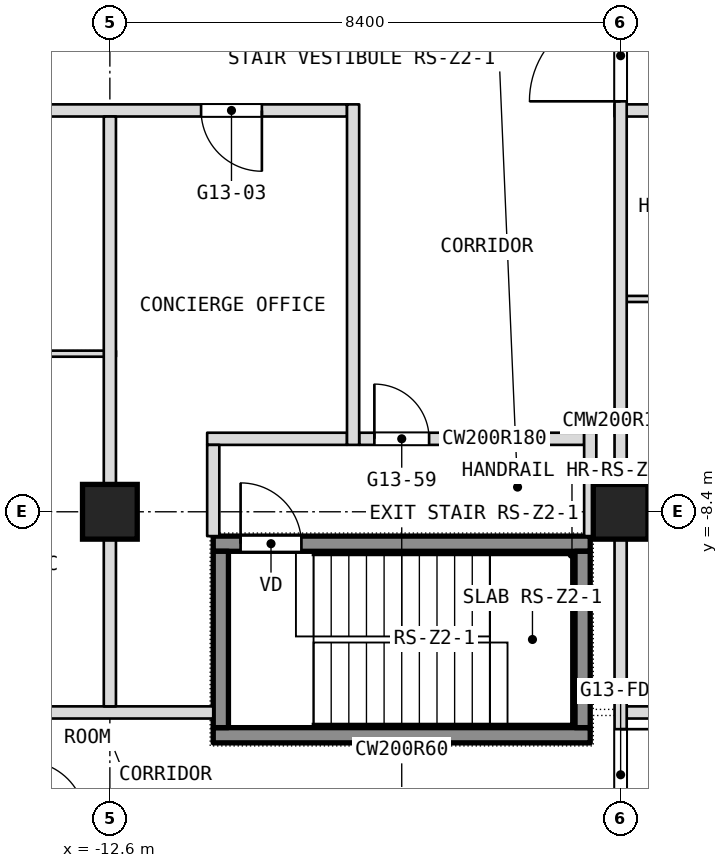
"""IFC4 building model, lengths in metres.
Left out: names, types, materials, properties, quantities, classifications, styles, units other than length and angle.
Written with IfcOpenShell. Run it as: python <this file> out.ifc"""

import sys

from ifc_helpers import new_model, si_unit, direction, frame, frame_2d, origin, origin_2d, place, context, subcontext, project, spatial, rectangle, extrude, element, fill, save


model = new_model("IFC4")
c1 = context("Model", 3, precision=1e-05, world=origin(), true_north=direction((0.0, 1.0)))
c2 = subcontext(c1, "Body", "Model", "MODEL_VIEW")
j1 = project(units=[si_unit("LENGTHUNIT", "METRE"), si_unit("PLANEANGLEUNIT", "RADIAN")], contexts=[c1])
p1 = place(None, origin())
s1 = spatial("IfcSite", under=j1, at=p1, CompositionType="ELEMENT")
p2 = place(p1, origin())
s2 = spatial("IfcBuilding", under=s1, at=p2, CompositionType="ELEMENT")
p3 = place(p2, frame((0.0, 0.0, 155.3)))
s3 = spatial("IfcBuildingStorey", under=s2, at=p3, CompositionType="ELEMENT", Elevation=155.3)
for number, where, z_axis, x_axis in (
    (1, (-12.6, -8.4, 0.0), (0.0, 0.0, 1.0), (1.0, 0.0, 0.0)),
    (2, (-4.2, -8.4, 0.0), (0.0, 0.0, 1.0), (1.0, 0.0, 0.0)),
):
    element("IfcColumn", number, at=place(p3, frame(where, z_axis=z_axis, x_axis=x_axis)), inside=s3, PredefinedType="COLUMN", context=c2, shape_type="SweptSolid", body=[
        extrude(rectangle(XDim=0.9, YDim=0.9, at=origin_2d()), origin(), (0.0, 0.0, 1.0), 3.6),
    ])
p4 = place(p3, frame((-16.7, -11.7, 0.0), z_axis=(0.0, 0.0, 1.0), x_axis=(1.0, 0.0, 0.0)))
e3 = element("IfcWall", 3, at=p4, inside=s3, PredefinedType="PARTITIONING", context=c2, shape_type="SweptSolid", body=[
    extrude(rectangle(XDim=5.8, YDim=0.2, at=frame_2d((2.9, 0.0))), origin(), (0.0, 0.0, 1.0), 3.34),
])
p5 = place(p3, frame((-4.1, -11.7, 0.0), z_axis=(0.0, 0.0, 1.0), x_axis=(1.0, 0.0, 0.0)))
e4 = element("IfcWall", 4, at=p5, inside=s3, PredefinedType="PARTITIONING", context=c2, shape_type="SweptSolid", body=[
    extrude(rectangle(XDim=20.8, YDim=0.2, at=frame_2d((10.4, 0.0))), origin(), (0.0, 0.0, 1.0), 3.34),
])
p6 = place(p5, frame((14.1, 0.0, 0.0)))
e5 = element("IfcOpeningElement", 5, at=p6, cuts=e4, PredefinedType="OPENING", context=c2, shape_type="SweptSolid", body=[
    extrude(rectangle(XDim=1.0, YDim=2.1, at=frame_2d((0.5, 1.05))), frame((0.0, 0.1, 0.0), z_axis=(0.0, -1.0, 0.0), x_axis=(1.0, 0.0, 0.0)), (0.0, 0.0, 1.0), 0.2),
])
p7 = place(p5, frame((5.7, 0.0, 0.0)))
e6 = element("IfcOpeningElement", 6, at=p7, cuts=e4, PredefinedType="OPENING", context=c2, shape_type="SweptSolid", body=[
    extrude(rectangle(XDim=1.0, YDim=2.1, at=frame_2d((0.5, 1.05))), frame((0.0, 0.1, 0.0), z_axis=(0.0, -1.0, 0.0), x_axis=(1.0, 0.0, 0.0)), (0.0, 0.0, 1.0), 0.2),
])
p8 = place(p3, frame((-11.0, -7.2, 0.0), z_axis=(0.0, 0.0, 1.0), x_axis=(1.0, 0.0, 0.0)))
e7 = element("IfcWall", 7, at=p8, inside=s3, PredefinedType="PARTITIONING", context=c2, shape_type="SweptSolid", body=[
    extrude(rectangle(XDim=2.3, YDim=0.2, at=frame_2d((1.15, 0.0))), origin(), (0.0, 0.0, 1.0), 3.34),
])
p9 = place(p3, frame((-8.5, -7.2, 0.0), z_axis=(0.0, 0.0, 1.0), x_axis=(1.0, 0.0, 0.0)))
e8 = element("IfcWall", 8, at=p9, inside=s3, PredefinedType="PARTITIONING", context=c2, shape_type="SweptSolid", body=[
    extrude(rectangle(XDim=3.7, YDim=0.2, at=frame_2d((1.85, 0.0))), origin(), (0.0, 0.0, 1.0), 3.34),
])
p10 = place(p9, frame((0.25, 0.0, 0.0)))
e9 = element("IfcOpeningElement", 9, at=p10, cuts=e8, PredefinedType="OPENING", context=c2, shape_type="SweptSolid", body=[
    extrude(rectangle(XDim=0.9, YDim=2.1, at=frame_2d((0.45, 1.05))), frame((0.0, 0.1, 0.0), z_axis=(0.0, -1.0, 0.0), x_axis=(1.0, 0.0, 0.0)), (0.0, 0.0, 1.0), 0.2),
])
p11 = place(p3, frame((-16.7, -5.8, 0.0), z_axis=(0.0, 0.0, 1.0), x_axis=(1.0, 0.0, 0.0)))
e10 = element("IfcWall", 10, at=p11, inside=s3, PredefinedType="PARTITIONING", context=c2, shape_type="SweptSolid", body=[
    extrude(rectangle(XDim=4.2, YDim=0.1, at=frame_2d((2.1, 0.0))), origin(), (0.0, 0.0, 1.0), 3.34),
])
p12 = place(p11, frame((1.55, 0.0, 0.0)))
e11 = element("IfcOpeningElement", 11, at=p12, cuts=e10, PredefinedType="OPENING", context=c2, shape_type="SweptSolid", body=[
    extrude(rectangle(XDim=0.9, YDim=2.1, at=frame_2d((0.45, 1.05))), frame((0.0, 0.05, 0.0), z_axis=(0.0, -1.0, 0.0), x_axis=(1.0, 0.0, 0.0)), (0.0, 0.0, 1.0), 0.1),
])
p13 = place(p3, frame((-4.1, -4.9, 0.0), z_axis=(0.0, 0.0, 1.0), x_axis=(1.0, 0.0, 0.0)))
e12 = element("IfcWall", 12, at=p13, inside=s3, PredefinedType="PARTITIONING", context=c2, shape_type="SweptSolid", body=[
    extrude(rectangle(XDim=4.2, YDim=0.1, at=frame_2d((2.1, 0.0))), origin(), (0.0, 0.0, 1.0), 3.34),
])
p14 = place(p13, frame((1.55, 0.0, 0.0)))
e13 = element("IfcOpeningElement", 13, at=p14, cuts=e12, PredefinedType="OPENING", context=c2, shape_type="SweptSolid", body=[
    extrude(rectangle(XDim=0.9, YDim=2.1, at=frame_2d((0.45, 1.05))), frame((0.0, 0.05, 0.0), z_axis=(0.0, -1.0, 0.0), x_axis=(1.0, 0.0, 0.0)), (0.0, 0.0, 1.0), 0.1),
])
p15 = place(p3, frame((-16.9, -1.8, 0.0), z_axis=(0.0, 0.0, 1.0), x_axis=(1.0, 0.0, 0.0)))
e14 = element("IfcWall", 14, at=p15, inside=s3, PredefinedType="PARTITIONING", context=c2, shape_type="SweptSolid", body=[
    extrude(rectangle(XDim=8.2, YDim=0.2, at=frame_2d((4.1, 0.0))), origin(), (0.0, 0.0, 1.0), 3.34),
])
p16 = place(p15, frame((1.7, 0.0, 0.0)))
e15 = element("IfcOpeningElement", 15, at=p16, cuts=e14, PredefinedType="OPENING", context=c2, shape_type="SweptSolid", body=[
    extrude(rectangle(XDim=1.0, YDim=2.1, at=frame_2d((0.5, 1.05))), frame((0.0, 0.1, 0.0), z_axis=(0.0, -1.0, 0.0), x_axis=(1.0, 0.0, 0.0)), (0.0, 0.0, 1.0), 0.2),
])
p17 = place(p15, frame((5.8, 0.0, 0.0)))
e16 = element("IfcOpeningElement", 16, at=p17, cuts=e14, PredefinedType="OPENING", context=c2, shape_type="SweptSolid", body=[
    extrude(rectangle(XDim=1.0, YDim=2.1, at=frame_2d((0.5, 1.05))), frame((0.0, 0.1, 0.0), z_axis=(0.0, -1.0, 0.0), x_axis=(1.0, 0.0, 0.0)), (0.0, 0.0, 1.0), 0.2),
])
p18 = place(p3, frame((-4.3, -1.8, 0.0), z_axis=(0.0, 0.0, 1.0), x_axis=(1.0, 0.0, 0.0)))
e17 = element("IfcWall", 17, at=p18, inside=s3, PredefinedType="PARTITIONING", context=c2, shape_type="SweptSolid", body=[
    extrude(rectangle(XDim=11.3, YDim=0.2, at=frame_2d((5.65, 0.0))), origin(), (0.0, 0.0, 1.0), 3.34),
])
p19 = place(p18, frame((1.7, 0.0, 0.0)))
e18 = element("IfcOpeningElement", 18, at=p19, cuts=e17, PredefinedType="OPENING", context=c2, shape_type="SweptSolid", body=[
    extrude(rectangle(XDim=1.0, YDim=2.1, at=frame_2d((0.5, 1.05))), frame((0.0, 0.1, 0.0), z_axis=(0.0, -1.0, 0.0), x_axis=(1.0, 0.0, 0.0)), (0.0, 0.0, 1.0), 0.2),
])
p20 = place(p18, frame((10.1, 0.0, 0.0)))
e19 = element("IfcOpeningElement", 19, at=p20, cuts=e17, PredefinedType="OPENING", context=c2, shape_type="SweptSolid", body=[
    extrude(rectangle(XDim=1.0, YDim=2.1, at=frame_2d((0.5, 1.05))), frame((0.0, 0.1, 0.0), z_axis=(0.0, -1.0, 0.0), x_axis=(1.0, 0.0, 0.0)), (0.0, 0.0, 1.0), 0.2),
])
p21 = place(p18, frame((5.9, 0.0, 0.0)))
e20 = element("IfcOpeningElement", 20, at=p21, cuts=e17, PredefinedType="OPENING", context=c2, shape_type="SweptSolid", body=[
    extrude(rectangle(XDim=1.0, YDim=2.1, at=frame_2d((0.5, 1.05))), frame((0.0, 0.1, 0.0), z_axis=(0.0, -1.0, 0.0), x_axis=(1.0, 0.0, 0.0)), (0.0, 0.0, 1.0), 0.2),
])
p22 = place(p3, frame((-4.2, -13.8, 0.0), z_axis=(0.0, 0.0, 1.0), x_axis=(0.0, 1.0, 0.0)))
e21 = element("IfcWall", 21, at=p22, inside=s3, PredefinedType="PARTITIONING", context=c2, shape_type="SweptSolid", body=[
    extrude(rectangle(XDim=13.8, YDim=0.2, at=frame_2d((6.9, 0.0))), origin(), (0.0, 0.0, 1.0), 3.34),
])
p23 = place(p22, frame((12.15, 0.0, 0.0)))
e22 = element("IfcOpeningElement", 22, at=p23, cuts=e21, PredefinedType="OPENING", context=c2, shape_type="SweptSolid", body=[
    extrude(rectangle(XDim=1.5, YDim=2.1, at=frame_2d((0.75, 1.05))), frame((0.0, 0.1, 0.0), z_axis=(0.0, -1.0, 0.0), x_axis=(1.0, 0.0, 0.0)), (0.0, 0.0, 1.0), 0.2),
])
p24 = place(p22, frame((0.325, 0.0, 0.0)))
e23 = element("IfcOpeningElement", 23, at=p24, cuts=e21, PredefinedType="OPENING", context=c2, shape_type="SweptSolid", body=[
    extrude(rectangle(XDim=1.5, YDim=2.1, at=frame_2d((0.75, 1.05))), frame((0.0, 0.1, 0.0), z_axis=(0.0, -1.0, 0.0), x_axis=(1.0, 0.0, 0.0)), (0.0, 0.0, 1.0), 0.2),
])
p25 = place(p3, frame((-4.7, -8.8, 0.0), z_axis=(0.0, 0.0, 1.0), x_axis=(0.0, 1.0, 0.0)))
e24 = element("IfcWall", 24, at=p25, inside=s3, PredefinedType="PARTITIONING", context=c2, shape_type="SweptSolid", body=[
    extrude(rectangle(XDim=1.7, YDim=0.2, at=frame_2d((0.85, 0.0))), origin(), (0.0, 0.0, 1.0), 3.34),
])
p26 = place(p3, frame((-8.6, -7.3, 0.0), z_axis=(0.0, 0.0, 1.0), x_axis=(0.0, 1.0, 0.0)))
e25 = element("IfcWall", 25, at=p26, inside=s3, PredefinedType="PARTITIONING", context=c2, shape_type="SweptSolid", body=[
    extrude(rectangle(XDim=5.6, YDim=0.2, at=frame_2d((2.8, 0.0))), origin(), (0.0, 0.0, 1.0), 3.34),
])
p27 = place(p3, frame((-10.9, -8.8, 0.0), z_axis=(0.0, 0.0, 1.0), x_axis=(0.0, 1.0, 0.0)))
e26 = element("IfcWall", 26, at=p27, inside=s3, PredefinedType="PARTITIONING", context=c2, shape_type="SweptSolid", body=[
    extrude(rectangle(XDim=1.5, YDim=0.2, at=frame_2d((0.75, 0.0))), origin(), (0.0, 0.0, 1.0), 3.34),
])
p28 = place(p3, frame((-12.6, -11.6, 0.0), z_axis=(0.0, 0.0, 1.0), x_axis=(0.0, 1.0, 0.0)))
e27 = element("IfcWall", 27, at=p28, inside=s3, PredefinedType="PARTITIONING", context=c2, shape_type="SweptSolid", body=[
    extrude(rectangle(XDim=9.7, YDim=0.2, at=frame_2d((4.85, 0.0))), origin(), (0.0, 0.0, 1.0), 3.34),
])
p29 = place(p3, frame((-10.9, -12.075, 0.1), z_axis=(0.0, 0.0, 1.0), x_axis=(1.0, 0.0, 0.0)))
e28 = element("IfcWall", 28, at=p29, inside=s3, PredefinedType="SHEAR", context=c2, shape_type="SweptSolid", body=[
    extrude(rectangle(XDim=6.2, YDim=0.25, at=frame_2d((3.1, 0.0))), origin(), (0.0, 0.0, 1.0), 3.6),
])
p30 = place(p3, frame((-10.9, -8.925, 0.1), z_axis=(0.0, 0.0, 1.0), x_axis=(1.0, 0.0, 0.0)))
e29 = element("IfcWall", 29, at=p30, inside=s3, PredefinedType="SHEAR", context=c2, shape_type="SweptSolid", body=[
    extrude(rectangle(XDim=6.2, YDim=0.25, at=frame_2d((3.1, 0.0))), origin(), (0.0, 0.0, 1.0), 3.6),
])
p31 = place(p30, frame((0.45, 0.0, 0.0)))
e30 = element("IfcOpeningElement", 30, at=p31, cuts=e29, PredefinedType="OPENING", context=c2, shape_type="SweptSolid", body=[
    extrude(rectangle(XDim=1.0, YDim=2.1, at=frame_2d((0.5, 1.05))), frame((0.0, 0.125, 0.0), z_axis=(0.0, -1.0, 0.0), x_axis=(1.0, 0.0, 0.0)), (0.0, 0.0, 1.0), 0.25),
])
for number, where, z_axis, x_axis in (
    (31, (-10.775, -11.95, 0.1), (0.0, 0.0, 1.0), (0.0, 1.0, 0.0)),
    (32, (-4.825, -11.95, 0.1), (0.0, 0.0, 1.0), (0.0, 1.0, 0.0)),
):
    element("IfcWall", number, at=place(p3, frame(where, z_axis=z_axis, x_axis=x_axis)), inside=s3, PredefinedType="SHEAR", context=c2, shape_type="SweptSolid", body=[
        extrude(rectangle(XDim=2.9, YDim=0.25, at=frame_2d((1.45, 0.0))), origin(), (0.0, 0.0, 1.0), 3.6),
    ])
p32 = place(p10, origin())
e33 = element("IfcDoor", 33, at=p32, inside=s3, OperationType="SINGLE_SWING_RIGHT", PredefinedType="DOOR", context=c2, shape_type="SweptSolid", body=[
    extrude(rectangle(XDim=0.9, YDim=2.1, at=frame_2d((0.45, 1.05))), frame((0.0, 0.025, 0.0), z_axis=(0.0, -1.0, 0.0), x_axis=(1.0, 0.0, 0.0)), (0.0, 0.0, 1.0), 0.05),
])
fill(e9, e33)
p33 = place(p17, origin())
e34 = element("IfcDoor", 34, at=p33, inside=s3, OperationType="SINGLE_SWING_LEFT", PredefinedType="DOOR", context=c2, shape_type="SweptSolid", body=[
    extrude(rectangle(XDim=1.0, YDim=2.1, at=frame_2d((0.5, 1.05))), frame((0.0, 0.025, 0.0), z_axis=(0.0, -1.0, 0.0), x_axis=(1.0, 0.0, 0.0)), (0.0, 0.0, 1.0), 0.05),
])
fill(e16, e34)
p34 = place(p31, origin())
e35 = element("IfcDoor", 35, at=p34, inside=s3, OperationType="SINGLE_SWING_LEFT", PredefinedType="DOOR", context=c2, shape_type="SweptSolid", body=[
    extrude(rectangle(XDim=1.0, YDim=2.1, at=frame_2d((0.5, 1.05))), frame((0.0, 0.025, 0.0), z_axis=(0.0, -1.0, 0.0), x_axis=(1.0, 0.0, 0.0)), (0.0, 0.0, 1.0), 0.05),
])
fill(e30, e35)
p35 = place(p23, origin())
e36 = element("IfcDoor", 36, at=p35, inside=s3, OperationType="DOUBLE_DOOR_DOUBLE_SWING", PredefinedType="DOOR", context=c2, shape_type="SweptSolid", body=[
    extrude(rectangle(XDim=1.5, YDim=2.1, at=frame_2d((0.75, 1.05))), frame((0.0, 0.025, 0.0), z_axis=(0.0, -1.0, 0.0), x_axis=(1.0, 0.0, 0.0)), (0.0, 0.0, 1.0), 0.05),
])
fill(e22, e36)
p36 = place(p24, origin())
e37 = element("IfcDoor", 37, at=p36, inside=s3, OperationType="DOUBLE_DOOR_DOUBLE_SWING", PredefinedType="DOOR", context=c2, shape_type="SweptSolid", body=[
    extrude(rectangle(XDim=1.5, YDim=2.1, at=frame_2d((0.75, 1.05))), frame((0.0, 0.025, 0.0), z_axis=(0.0, -1.0, 0.0), x_axis=(1.0, 0.0, 0.0)), (0.0, 0.0, 1.0), 0.05),
])
fill(e23, e37)
save(model, sys.argv[1])
